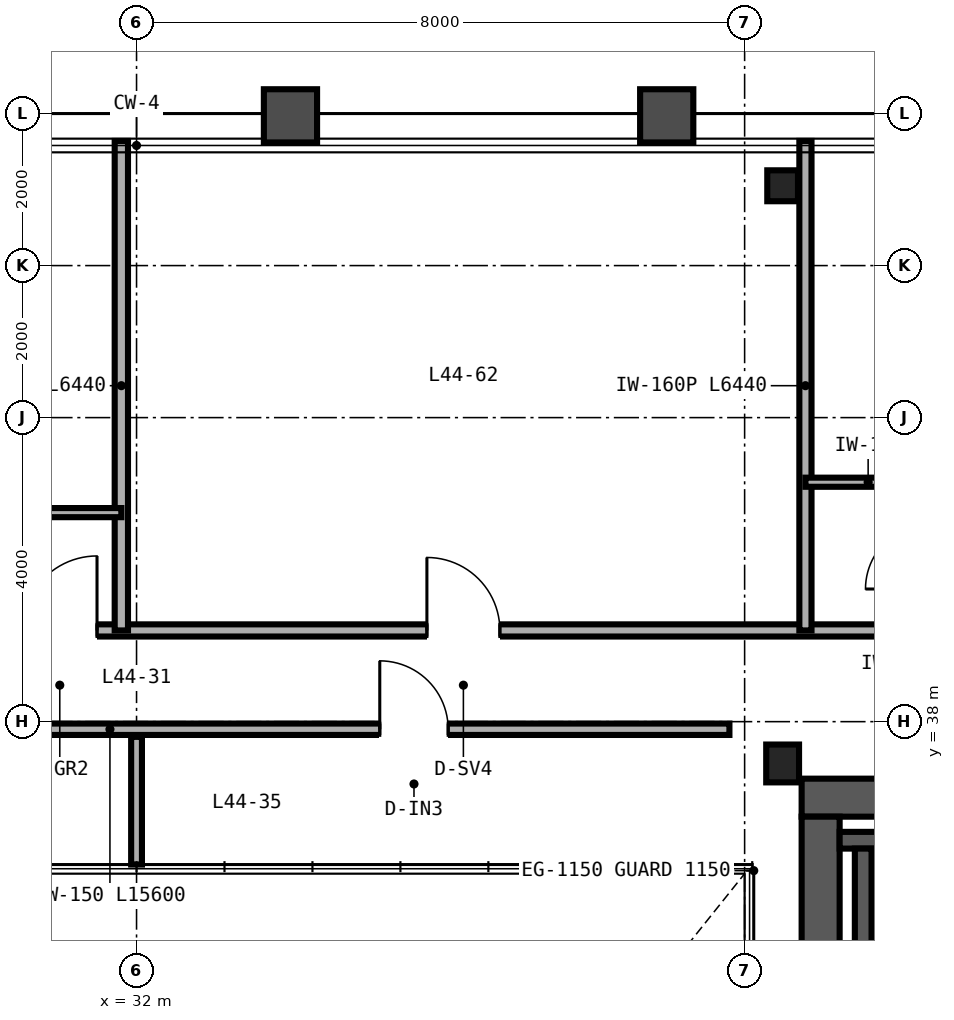
"""IFC4 building model, lengths in metres.
Left out: names, types, materials, properties, quantities, classifications, styles, units other than length and angle.
Written with IfcOpenShell. Run it as: python <this file> out.ifc"""

import sys

from ifc_helpers import new_model, si_unit, direction, frame, frame_2d, origin, origin_2d, place, context, subcontext, project, spatial, rectangle, i_section, extrude, source, transform, mapped, element, fill, save


model = new_model("IFC4")
c1 = context("Model", 3, precision=1e-05, world=origin(), true_north=direction((0.0, 1.0)))
c2 = subcontext(c1, "Body", "Model", "MODEL_VIEW")
j1 = project(units=[si_unit("LENGTHUNIT", "METRE"), si_unit("PLANEANGLEUNIT", "RADIAN")], contexts=[c1])
p1 = place(None, origin())
s1 = spatial("IfcSite", under=j1, at=p1, CompositionType="ELEMENT")
p2 = place(p1, origin())
s2 = spatial("IfcBuilding", under=s1, at=p2, CompositionType="ELEMENT")
p3 = place(p2, frame((0.0, 0.0, 177.6)))
s3 = spatial("IfcBuildingStorey", under=s2, at=p3, CompositionType="ELEMENT", Elevation=177.6)
p4 = place(p3, frame((40.75, 37.0, 0.0), z_axis=(0.0, 0.0, 1.0), x_axis=(1.0, 0.0, 0.0)))
e1 = element("IfcWall", 1, at=p4, inside=s3, PredefinedType="SHEAR", context=c2, shape_type="SweptSolid", body=[
    extrude(rectangle(XDim=12.5, YDim=0.5, at=frame_2d((6.25, 0.0))), origin(), (0.0, 0.0, 1.0), 3.37),
])
p5 = place(p4, frame((9.95, 0.0, 0.0)))
e2 = element("IfcOpeningElement", 2, at=p5, cuts=e1, PredefinedType="OPENING", context=c2, shape_type="SweptSolid", body=[
    extrude(rectangle(XDim=1.1, YDim=2.15, at=frame_2d((0.55, 1.075))), frame((0.0, 0.26, 0.0), z_axis=(0.0, -1.0, 0.0), x_axis=(1.0, 0.0, 0.0)), (0.0, 0.0, 1.0), 0.52),
])
p6 = place(p3, frame((41.0, 15.25, 0.0), z_axis=(0.0, 0.0, 1.0), x_axis=(0.0, 1.0, 0.0)))
e3 = element("IfcWall", 3, at=p6, inside=s3, PredefinedType="SHEAR", context=c2, shape_type="SweptSolid", body=[
    extrude(rectangle(XDim=21.5, YDim=0.5, at=frame_2d((10.75, 0.0))), origin(), (0.0, 0.0, 1.0), 3.37),
])
p7 = place(p3, frame((41.25, 36.44, 0.0), z_axis=(0.0, 0.0, 1.0), x_axis=(1.0, 0.0, 0.0)))
e4 = element("IfcWall", 4, at=p7, inside=s3, PredefinedType="SHEAR", context=c2, shape_type="SweptSolid", body=[
    extrude(rectangle(XDim=8.06, YDim=0.22, at=frame_2d((4.03, 0.0))), origin(), (0.0, 0.0, 1.0), 3.4),
])
p8 = place(p3, frame((41.56, 33.05, 0.0), z_axis=(0.0, 0.0, 1.0), x_axis=(0.0, 1.0, 0.0)))
e5 = element("IfcWall", 5, at=p8, inside=s3, PredefinedType="SHEAR", context=c2, shape_type="SweptSolid", body=[
    extrude(rectangle(XDim=3.28, YDim=0.22, at=frame_2d((1.64, 0.0))), origin(), (0.0, 0.0, 1.0), 3.4),
])
m1 = source(origin(), c2, "Body", "SweptSolid", [
    extrude(i_section(OverallWidth=0.432, OverallDepth=0.498, WebThickness=0.056, FlangeThickness=0.089, FilletRadius=0.025, at=origin_2d()), origin(), (0.0, 0.0, 1.0), 3.37),
])
p9 = place(p3, frame((40.5, 37.45, 0.0), z_axis=(0.0, 0.0, 1.0), x_axis=(1.0, 0.0, 0.0)))
e6 = element("IfcColumn", 6, at=p9, inside=s3, PredefinedType="COLUMN", context=c2, shape_type="MappedRepresentation", body=[
    mapped(m1, transform((0.0, 0.0, 0.0), scale=1.0)),
])
m2 = source(origin(), c2, "Body", "SweptSolid", [
    extrude(i_section(OverallWidth=0.404, OverallDepth=0.407, WebThickness=0.027, FlangeThickness=0.044, FilletRadius=0.025, at=origin_2d()), origin(), (0.0, 0.0, 1.0), 3.37),
])
p10 = place(p3, frame((40.5, 45.05, 0.0), z_axis=(0.0, 0.0, 1.0), x_axis=(1.0, 0.0, 0.0)))
e7 = element("IfcColumn", 7, at=p10, inside=s3, PredefinedType="COLUMN", context=c2, shape_type="MappedRepresentation", body=[
    mapped(m2, transform((0.0, 0.0, 0.0), scale=1.0)),
])
p11 = place(p3, frame((24.2, 37.9, 0.0), z_axis=(0.0, 0.0, 1.0), x_axis=(1.0, 0.0, 0.0)))
e8 = element("IfcWall", 8, at=p11, inside=s3, PredefinedType="PARTITIONING", context=c2, shape_type="SweptSolid", body=[
    extrude(rectangle(XDim=15.6, YDim=0.15, at=frame_2d((7.8, 0.0))), origin(), (0.0, 0.0, 1.0), 3.37),
])
p12 = place(p11, frame((3.0, 0.0, 0.0)))
e9 = element("IfcOpeningElement", 9, at=p12, cuts=e8, PredefinedType="OPENING", context=c2, shape_type="SweptSolid", body=[
    extrude(rectangle(XDim=0.9, YDim=2.15, at=frame_2d((0.45, 1.075))), frame((0.0, 0.085, 0.0), z_axis=(0.0, -1.0, 0.0), x_axis=(1.0, 0.0, 0.0)), (0.0, 0.0, 1.0), 0.17),
])
p13 = place(p11, frame((11.0, 0.0, 0.0)))
e10 = element("IfcOpeningElement", 10, at=p13, cuts=e8, PredefinedType="OPENING", context=c2, shape_type="SweptSolid", body=[
    extrude(rectangle(XDim=0.9, YDim=2.15, at=frame_2d((0.45, 1.075))), frame((0.0, 0.085, 0.0), z_axis=(0.0, -1.0, 0.0), x_axis=(1.0, 0.0, 0.0)), (0.0, 0.0, 1.0), 0.17),
])
p14 = place(p3, frame((32.0, 36.12, 0.0), z_axis=(0.0, 0.0, 1.0), x_axis=(0.0, 1.0, 0.0)))
e11 = element("IfcWall", 11, at=p14, inside=s3, PredefinedType="PARTITIONING", context=c2, shape_type="SweptSolid", body=[
    extrude(rectangle(XDim=1.68, YDim=0.142, at=frame_2d((0.84, 0.0))), origin(), (0.0, 0.0, 1.0), 3.37),
])
p15 = place(p3, frame((14.0, 39.2, 0.0), z_axis=(0.0, 0.0, 1.0), x_axis=(1.0, 0.0, 0.0)))
e12 = element("IfcWall", 12, at=p15, inside=s3, PredefinedType="PARTITIONING", context=c2, shape_type="SweptSolid", body=[
    extrude(rectangle(XDim=36.0, YDim=0.16, at=frame_2d((18.0, 0.0))), origin(), (0.0, 0.0, 1.0), 2.913),
])
p16 = place(p15, frame((7.5, 0.0, 0.0)))
e13 = element("IfcOpeningElement", 13, at=p16, cuts=e12, PredefinedType="OPENING", context=c2, shape_type="SweptSolid", body=[
    extrude(rectangle(XDim=0.98, YDim=2.2, at=frame_2d((0.49, 1.1))), frame((0.0, 0.09, 0.0), z_axis=(0.0, -1.0, 0.0), x_axis=(1.0, 0.0, 0.0)), (0.0, 0.0, 1.0), 0.18),
])
p17 = place(p15, frame((16.5, 0.0, 0.0)))
e14 = element("IfcOpeningElement", 14, at=p17, cuts=e12, PredefinedType="OPENING", context=c2, shape_type="SweptSolid", body=[
    extrude(rectangle(XDim=0.98, YDim=2.2, at=frame_2d((0.49, 1.1))), frame((0.0, 0.09, 0.0), z_axis=(0.0, -1.0, 0.0), x_axis=(1.0, 0.0, 0.0)), (0.0, 0.0, 1.0), 0.18),
])
p18 = place(p15, frame((21.82, 0.0, 0.0)))
e15 = element("IfcOpeningElement", 15, at=p18, cuts=e12, PredefinedType="OPENING", context=c2, shape_type="SweptSolid", body=[
    extrude(rectangle(XDim=0.96, YDim=2.15, at=frame_2d((0.48, 1.075))), frame((0.0, 0.09, 0.0), z_axis=(0.0, -1.0, 0.0), x_axis=(1.0, 0.0, 0.0)), (0.0, 0.0, 1.0), 0.18),
])
p19 = place(p15, frame((30.14, 0.0, 0.0)))
e16 = element("IfcOpeningElement", 16, at=p19, cuts=e12, PredefinedType="OPENING", context=c2, shape_type="SweptSolid", body=[
    extrude(rectangle(XDim=0.94, YDim=2.15, at=frame_2d((0.47, 1.075))), frame((0.0, 0.09, 0.0), z_axis=(0.0, -1.0, 0.0), x_axis=(1.0, 0.0, 0.0)), (0.0, 0.0, 1.0), 0.18),
])
p20 = place(p15, frame((34.74, 0.0, 0.0)))
e17 = element("IfcOpeningElement", 17, at=p20, cuts=e12, PredefinedType="OPENING", context=c2, shape_type="SweptSolid", body=[
    extrude(rectangle(XDim=0.94, YDim=2.15, at=frame_2d((0.47, 1.075))), frame((0.0, 0.09, 0.0), z_axis=(0.0, -1.0, 0.0), x_axis=(1.0, 0.0, 0.0)), (0.0, 0.0, 1.0), 0.18),
])
p21 = place(p3, frame((31.8, 39.2, 0.0), z_axis=(0.0, 0.0, 1.0), x_axis=(0.0, 1.0, 0.0)))
e18 = element("IfcWall", 18, at=p21, inside=s3, PredefinedType="PARTITIONING", context=c2, shape_type="SweptSolid", body=[
    extrude(rectangle(XDim=6.44, YDim=0.175, at=frame_2d((3.22, 0.0))), origin(), (0.0, 0.0, 1.0), 2.443),
])
p22 = place(p3, frame((30.7, 40.75, 0.0), z_axis=(0.0, 0.0, 1.0), x_axis=(1.0, 0.0, 0.0)))
e19 = element("IfcWall", 19, at=p22, inside=s3, PredefinedType="PARTITIONING", context=c2, shape_type="SweptSolid", body=[
    extrude(rectangle(XDim=1.1, YDim=0.12, at=frame_2d((0.55, 0.0))), origin(), (0.0, 0.0, 1.0), 3.37),
])
p23 = place(p3, frame((40.8, 39.2, 0.0), z_axis=(0.0, 0.0, 1.0), x_axis=(0.0, 1.0, 0.0)))
e20 = element("IfcWall", 20, at=p23, inside=s3, PredefinedType="PARTITIONING", context=c2, shape_type="SweptSolid", body=[
    extrude(rectangle(XDim=6.44, YDim=0.16, at=frame_2d((3.22, 0.0))), origin(), (0.0, 0.0, 1.0), 2.443),
])
p24 = place(p3, frame((40.8, 41.15, 0.0), z_axis=(0.0, 0.0, 1.0), x_axis=(1.0, 0.0, 0.0)))
e21 = element("IfcWall", 21, at=p24, inside=s3, PredefinedType="PARTITIONING", context=c2, shape_type="SweptSolid", body=[
    extrude(rectangle(XDim=1.65, YDim=0.12, at=frame_2d((0.825, 0.0))), origin(), (0.0, 0.0, 1.0), 3.37),
])
m3 = source(origin(), c2, "Body", "SweptSolid", [
    extrude(rectangle(XDim=0.9, YDim=2.15, at=frame_2d((0.45, 1.075))), frame((0.0, 0.025, 0.0), z_axis=(0.0, -1.0, 0.0), x_axis=(1.0, 0.0, 0.0)), (0.0, 0.0, 1.0), 0.05),
])
p25 = place(p13, origin())
e22 = element("IfcDoor", 22, at=p25, inside=s3, OperationType="SINGLE_SWING_LEFT", PredefinedType="DOOR", context=c2, shape_type="MappedRepresentation", body=[
    mapped(m3, transform((0.0, 0.0, 0.0), scale=1.0)),
])
fill(e10, e22)
m4 = source(origin(), c2, "Body", "SweptSolid", [
    extrude(rectangle(XDim=0.98, YDim=2.2, at=frame_2d((0.49, 1.1))), frame((0.0, 0.025, 0.0), z_axis=(0.0, -1.0, 0.0), x_axis=(1.0, 0.0, 0.0)), (0.0, 0.0, 1.0), 0.05),
])
p26 = place(p17, origin())
e23 = element("IfcDoor", 23, at=p26, inside=s3, OperationType="SINGLE_SWING_RIGHT", PredefinedType="DOOR", context=c2, shape_type="MappedRepresentation", body=[
    mapped(m4, transform((0.0, 0.0, 0.0), scale=1.0)),
])
fill(e14, e23)
m5 = source(origin(), c2, "Body", "SweptSolid", [
    extrude(rectangle(XDim=0.96, YDim=2.15, at=frame_2d((0.48, 1.075))), frame((0.0, 0.025, 0.0), z_axis=(0.0, -1.0, 0.0), x_axis=(1.0, 0.0, 0.0)), (0.0, 0.0, 1.0), 0.05),
])
p27 = place(p18, origin())
e24 = element("IfcDoor", 24, at=p27, inside=s3, OperationType="SINGLE_SWING_LEFT", PredefinedType="DOOR", context=c2, shape_type="MappedRepresentation", body=[
    mapped(m5, transform((0.0, 0.0, 0.0), scale=1.0)),
])
fill(e15, e24)
save(model, sys.argv[1])
